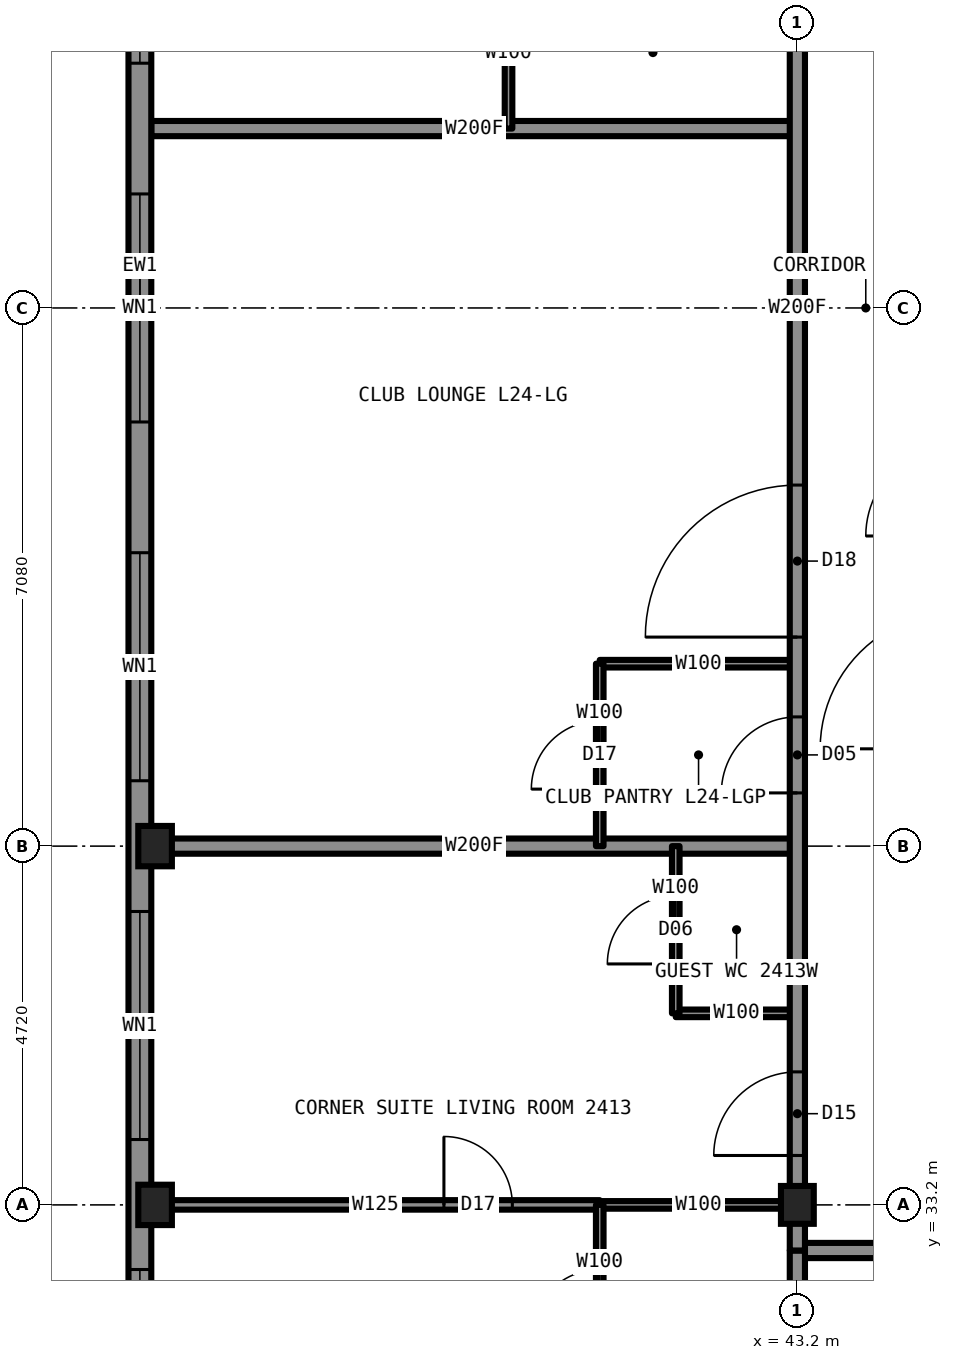
"""IFC4 building model, lengths in metres.
Left out: names, types, materials, properties, quantities, classifications, styles, units other than length and angle.
Written with IfcOpenShell. Run it as: python <this file> out.ifc"""

import sys

from ifc_helpers import new_model, si_unit, direction, frame, frame_2d, origin, origin_2d, place, context, subcontext, project, spatial, rectangle, i_section, extrude, element, fill, save


model = new_model("IFC4")
c1 = context("Model", 3, precision=1e-05, world=origin(), true_north=direction((0.0, 1.0)))
c2 = subcontext(c1, "Body", "Model", "MODEL_VIEW")
j1 = project(units=[si_unit("LENGTHUNIT", "METRE"), si_unit("PLANEANGLEUNIT", "RADIAN")], contexts=[c1])
p1 = place(None, origin())
s1 = spatial("IfcSite", under=j1, at=p1, CompositionType="ELEMENT")
p2 = place(p1, origin())
s2 = spatial("IfcBuilding", under=s1, at=p2, CompositionType="ELEMENT")
p3 = place(p2, frame((0.0, 0.0, 93.4)))
s3 = spatial("IfcBuildingStorey", under=s2, at=p3, CompositionType="ELEMENT", Elevation=93.4)
for number, where, z_axis, x_axis in (
    (1, (34.75, 33.2, 0.0), (0.0, 0.0, 1.0), (1.0, 0.0, 0.0)),
    (2, (34.75, 37.92, 0.0), (0.0, 0.0, 1.0), (1.0, 0.0, 0.0)),
):
    element("IfcColumn", number, at=place(p3, frame(where, z_axis=z_axis, x_axis=x_axis)), inside=s3, PredefinedType="COLUMN", context=c2, shape_type="SweptSolid", body=[
        extrude(i_section(OverallWidth=0.442, OverallDepth=0.531, WebThickness=0.066, FlangeThickness=0.106, at=origin_2d()), origin(), (0.0, 0.0, 1.0), 3.5),
    ])
p4 = place(p3, frame((43.2, 33.2, 0.0), z_axis=(0.0, 0.0, 1.0), x_axis=(1.0, 0.0, 0.0)))
e3 = element("IfcColumn", 3, at=p4, inside=s3, PredefinedType="COLUMN", context=c2, shape_type="SweptSolid", body=[
    extrude(i_section(OverallWidth=0.432, OverallDepth=0.498, WebThickness=0.056, FlangeThickness=0.089, at=origin_2d()), origin(), (0.0, 0.0, 1.0), 3.5),
])
p5 = place(p3, frame((40.6, 33.2, 0.0), z_axis=(0.0, 0.0, 1.0), x_axis=(1.0, 0.0, 0.0)))
e4 = element("IfcWall", 4, at=p5, inside=s3, PredefinedType="PARTITIONING", context=c2, shape_type="SweptSolid", body=[
    extrude(rectangle(XDim=2.6, YDim=0.1, at=frame_2d((1.3, 0.0))), origin(), (0.0, 0.0, 1.0), 2.573),
])
p6 = place(p3, frame((34.7, 33.2, 0.0), z_axis=(0.0, 0.0, 1.0), x_axis=(1.0, 0.0, 0.0)))
e5 = element("IfcWall", 5, at=p6, inside=s3, PredefinedType="PARTITIONING", context=c2, shape_type="SweptSolid", body=[
    extrude(rectangle(XDim=5.9, YDim=0.125, at=frame_2d((2.95, 0.0))), origin(), (0.0, 0.0, 1.0), 2.573),
])
p7 = place(p6, frame((3.85, 0.0, 0.0)))
e6 = element("IfcOpeningElement", 6, at=p7, cuts=e5, PredefinedType="OPENING", context=c2, shape_type="SweptSolid", body=[
    extrude(rectangle(XDim=0.9, YDim=2.2, at=frame_2d((0.45, 1.1))), frame((0.0, 0.073, 0.0), z_axis=(0.0, -1.0, 0.0), x_axis=(1.0, 0.0, 0.0)), (0.0, 0.0, 1.0), 0.145),
])
p8 = place(p3, frame((43.2, 32.6, 0.0), z_axis=(0.0, 0.0, 1.0), x_axis=(1.0, 0.0, 0.0)))
e7 = element("IfcWall", 7, at=p8, inside=s3, PredefinedType="PARTITIONING", context=c2, shape_type="SweptSolid", body=[
    extrude(rectangle(XDim=23.6, YDim=0.2, at=frame_2d((11.8, 0.0))), origin(), (0.0, 0.0, 1.0), 3.33),
])
p9 = place(p8, frame((3.0, 0.0, 0.0)))
e8 = element("IfcOpeningElement", 8, at=p9, cuts=e7, PredefinedType="OPENING", context=c2, shape_type="SweptSolid", body=[
    extrude(rectangle(XDim=1.0, YDim=2.2, at=frame_2d((0.5, 1.1))), frame((0.0, 0.11, 0.0), z_axis=(0.0, -1.0, 0.0), x_axis=(1.0, 0.0, 0.0)), (0.0, 0.0, 1.0), 0.22),
])
p10 = place(p8, frame((9.84, 0.0, 0.0)))
e9 = element("IfcOpeningElement", 9, at=p10, cuts=e7, PredefinedType="OPENING", context=c2, shape_type="SweptSolid", body=[
    extrude(rectangle(XDim=1.0, YDim=2.2, at=frame_2d((0.5, 1.1))), frame((0.0, 0.11, 0.0), z_axis=(0.0, -1.0, 0.0), x_axis=(1.0, 0.0, 0.0)), (0.0, 0.0, 1.0), 0.22),
])
p11 = place(p8, frame((17.16, 0.0, 0.0)))
e10 = element("IfcOpeningElement", 10, at=p11, cuts=e7, PredefinedType="OPENING", context=c2, shape_type="SweptSolid", body=[
    extrude(rectangle(XDim=1.0, YDim=2.2, at=frame_2d((0.5, 1.1))), frame((0.0, 0.11, 0.0), z_axis=(0.0, -1.0, 0.0), x_axis=(1.0, 0.0, 0.0)), (0.0, 0.0, 1.0), 0.22),
])
p12 = place(p3, frame((40.6, 40.32, 0.0), z_axis=(0.0, 0.0, 1.0), x_axis=(1.0, 0.0, 0.0)))
e11 = element("IfcWall", 11, at=p12, inside=s3, PredefinedType="PARTITIONING", context=c2, shape_type="SweptSolid", body=[
    extrude(rectangle(XDim=2.6, YDim=0.1, at=frame_2d((1.3, 0.0))), origin(), (0.0, 0.0, 1.0), 2.731),
])
p13 = place(p3, frame((34.7, 37.92, 0.0), z_axis=(0.0, 0.0, 1.0), x_axis=(1.0, 0.0, 0.0)))
e12 = element("IfcWall", 12, at=p13, inside=s3, PredefinedType="PARTITIONING", context=c2, shape_type="SweptSolid", body=[
    extrude(rectangle(XDim=8.5, YDim=0.2, at=frame_2d((4.25, 0.0))), origin(), (0.0, 0.0, 1.0), 2.573),
])
p14 = place(p3, frame((41.6, 35.72, 0.0), z_axis=(0.0, 0.0, 1.0), x_axis=(1.0, 0.0, 0.0)))
e13 = element("IfcWall", 13, at=p14, inside=s3, PredefinedType="PARTITIONING", context=c2, shape_type="SweptSolid", body=[
    extrude(rectangle(XDim=1.6, YDim=0.1, at=frame_2d((0.8, 0.0))), origin(), (0.0, 0.0, 1.0), 3.33),
])
p15 = place(p3, frame((34.7, 47.36, 0.0), z_axis=(0.0, 0.0, 1.0), x_axis=(1.0, 0.0, 0.0)))
e14 = element("IfcWall", 14, at=p15, inside=s3, PredefinedType="PARTITIONING", context=c2, shape_type="SweptSolid", body=[
    extrude(rectangle(XDim=8.5, YDim=0.2, at=frame_2d((4.25, 0.0))), origin(), (0.0, 0.0, 1.0), 2.731),
])
p16 = place(p3, frame((43.2, 33.22, 0.0), z_axis=(0.0, 0.0, 1.0), x_axis=(0.0, 1.0, 0.0)))
e15 = element("IfcWall", 15, at=p16, inside=s3, PredefinedType="PARTITIONING", context=c2, shape_type="SweptSolid", body=[
    extrude(rectangle(XDim=23.56, YDim=0.2, at=frame_2d((11.78, 0.0))), origin(), (0.0, 0.0, 1.0), 3.33),
])
p17 = place(p16, frame((16.4, 0.0, 0.0)))
e16 = element("IfcOpeningElement", 16, at=p17, cuts=e15, PredefinedType="OPENING", context=c2, shape_type="SweptSolid", body=[
    extrude(rectangle(XDim=1.0, YDim=2.2, at=frame_2d((0.5, 1.1))), frame((0.0, 0.11, 0.0), z_axis=(0.0, -1.0, 0.0), x_axis=(1.0, 0.0, 0.0)), (0.0, 0.0, 1.0), 0.22),
])
p18 = place(p16, frame((21.83, 0.0, 0.0)))
e17 = element("IfcOpeningElement", 17, at=p18, cuts=e15, PredefinedType="OPENING", context=c2, shape_type="SweptSolid", body=[
    extrude(rectangle(XDim=1.1, YDim=2.2, at=frame_2d((0.55, 1.1))), frame((0.0, 0.11, 0.0), z_axis=(0.0, -1.0, 0.0), x_axis=(1.0, 0.0, 0.0)), (0.0, 0.0, 1.0), 0.22),
])
p19 = place(p16, frame((0.63, 0.0, 0.0)))
e18 = element("IfcOpeningElement", 18, at=p19, cuts=e15, PredefinedType="OPENING", context=c2, shape_type="SweptSolid", body=[
    extrude(rectangle(XDim=1.1, YDim=2.2, at=frame_2d((0.55, 1.1))), frame((0.0, 0.11, 0.0), z_axis=(0.0, -1.0, 0.0), x_axis=(1.0, 0.0, 0.0)), (0.0, 0.0, 1.0), 0.22),
])
p20 = place(p16, frame((7.45, 0.0, 0.0)))
e19 = element("IfcOpeningElement", 19, at=p20, cuts=e15, PredefinedType="OPENING", context=c2, shape_type="SweptSolid", body=[
    extrude(rectangle(XDim=2.0, YDim=2.4, at=frame_2d((1.0, 1.2))), frame((0.0, 0.11, 0.0), z_axis=(0.0, -1.0, 0.0), x_axis=(1.0, 0.0, 0.0)), (0.0, 0.0, 1.0), 0.22),
])
p21 = place(p16, frame((5.4, 0.0, 0.0)))
e20 = element("IfcOpeningElement", 20, at=p21, cuts=e15, PredefinedType="OPENING", context=c2, shape_type="SweptSolid", body=[
    extrude(rectangle(XDim=1.0, YDim=2.1, at=frame_2d((0.5, 1.05))), frame((0.0, 0.11, 0.0), z_axis=(0.0, -1.0, 0.0), x_axis=(1.0, 0.0, 0.0)), (0.0, 0.0, 1.0), 0.22),
])
p22 = place(p3, frame((43.2, 24.7, 0.0), z_axis=(0.0, 0.0, 1.0), x_axis=(0.0, 1.0, 0.0)))
e21 = element("IfcWall", 21, at=p22, inside=s3, PredefinedType="PARTITIONING", context=c2, shape_type="SweptSolid", body=[
    extrude(rectangle(XDim=7.9, YDim=0.2, at=frame_2d((3.95, 0.0))), origin(), (0.0, 0.0, 1.0), 2.573),
])
p23 = place(p3, frame((41.6, 35.72, 0.0), z_axis=(0.0, 0.0, 1.0), x_axis=(0.0, 1.0, 0.0)))
e22 = element("IfcWall", 22, at=p23, inside=s3, PredefinedType="PARTITIONING", context=c2, shape_type="SweptSolid", body=[
    extrude(rectangle(XDim=2.2, YDim=0.1, at=frame_2d((1.1, 0.0))), origin(), (0.0, 0.0, 1.0), 3.33),
])
p24 = place(p23, frame((0.65, 0.0, 0.0)))
e23 = element("IfcOpeningElement", 23, at=p24, cuts=e22, PredefinedType="OPENING", context=c2, shape_type="SweptSolid", body=[
    extrude(rectangle(XDim=0.9, YDim=2.1, at=frame_2d((0.45, 1.05))), frame((0.0, 0.06, 0.0), z_axis=(0.0, -1.0, 0.0), x_axis=(1.0, 0.0, 0.0)), (0.0, 0.0, 1.0), 0.12),
])
p25 = place(p3, frame((40.6, 30.6, 0.0), z_axis=(0.0, 0.0, 1.0), x_axis=(0.0, 1.0, 0.0)))
e24 = element("IfcWall", 24, at=p25, inside=s3, PredefinedType="PARTITIONING", context=c2, shape_type="SweptSolid", body=[
    extrude(rectangle(XDim=2.6, YDim=0.1, at=frame_2d((1.3, 0.0))), origin(), (0.0, 0.0, 1.0), 3.33),
])
p26 = place(p25, frame((0.85, 0.0, 0.0)))
e25 = element("IfcOpeningElement", 25, at=p26, cuts=e24, PredefinedType="OPENING", context=c2, shape_type="SweptSolid", body=[
    extrude(rectangle(XDim=0.9, YDim=2.1, at=frame_2d((0.45, 1.05))), frame((0.0, 0.06, 0.0), z_axis=(0.0, -1.0, 0.0), x_axis=(1.0, 0.0, 0.0)), (0.0, 0.0, 1.0), 0.12),
])
p27 = place(p3, frame((40.6, 37.92, 0.0), z_axis=(0.0, 0.0, 1.0), x_axis=(0.0, 1.0, 0.0)))
e26 = element("IfcWall", 26, at=p27, inside=s3, PredefinedType="PARTITIONING", context=c2, shape_type="SweptSolid", body=[
    extrude(rectangle(XDim=2.4, YDim=0.1, at=frame_2d((1.2, 0.0))), origin(), (0.0, 0.0, 1.0), 3.33),
])
p28 = place(p27, frame((0.75, 0.0, 0.0)))
e27 = element("IfcOpeningElement", 27, at=p28, cuts=e26, PredefinedType="OPENING", context=c2, shape_type="SweptSolid", body=[
    extrude(rectangle(XDim=0.9, YDim=2.2, at=frame_2d((0.45, 1.1))), frame((0.0, 0.06, 0.0), z_axis=(0.0, -1.0, 0.0), x_axis=(1.0, 0.0, 0.0)), (0.0, 0.0, 1.0), 0.12),
])
p29 = place(p3, frame((39.4, 47.36, 0.0), z_axis=(0.0, 0.0, 1.0), x_axis=(0.0, 1.0, 0.0)))
e28 = element("IfcWall", 28, at=p29, inside=s3, PredefinedType="PARTITIONING", context=c2, shape_type="SweptSolid", body=[
    extrude(rectangle(XDim=2.0, YDim=0.1, at=frame_2d((1.0, 0.0))), origin(), (0.0, 0.0, 1.0), 3.33),
])
p30 = place(p3, frame((34.55, 60.1, 0.0), z_axis=(0.0, 0.0, 1.0), x_axis=(0.0, -1.0, 0.0)))
e29 = element("IfcWall", 29, at=p30, inside=s3, PredefinedType="SOLIDWALL", context=c2, shape_type="SweptSolid", body=[
    extrude(rectangle(XDim=30.2, YDim=0.3, at=frame_2d((15.1, 0.0))), origin(), (0.0, 0.0, 1.0), 2.83),
])
p31 = place(p30, frame((0.85, 0.0, 0.5)))
e30 = element("IfcOpeningElement", 30, at=p31, cuts=e29, PredefinedType="OPENING", context=c2, shape_type="SweptSolid", body=[
    extrude(rectangle(XDim=1.6, YDim=2.0, at=frame_2d((0.8, 1.0))), frame((0.0, 0.16, 0.0), z_axis=(0.0, -1.0, 0.0), x_axis=(1.0, 0.0, 0.0)), (0.0, 0.0, 1.0), 0.32),
])
p32 = place(p30, frame((4.16, 0.0, 0.5)))
e31 = element("IfcOpeningElement", 31, at=p32, cuts=e29, PredefinedType="OPENING", context=c2, shape_type="SweptSolid", body=[
    extrude(rectangle(XDim=3.0, YDim=2.0, at=frame_2d((1.5, 1.0))), frame((0.0, 0.16, 0.0), z_axis=(0.0, -1.0, 0.0), x_axis=(1.0, 0.0, 0.0)), (0.0, 0.0, 1.0), 0.32),
])
p33 = place(p30, frame((8.88, 0.0, 0.5)))
e32 = element("IfcOpeningElement", 32, at=p33, cuts=e29, PredefinedType="OPENING", context=c2, shape_type="SweptSolid", body=[
    extrude(rectangle(XDim=3.0, YDim=2.0, at=frame_2d((1.5, 1.0))), frame((0.0, 0.16, 0.0), z_axis=(0.0, -1.0, 0.0), x_axis=(1.0, 0.0, 0.0)), (0.0, 0.0, 1.0), 0.32),
])
p34 = place(p30, frame((13.6, 0.0, 0.5)))
e33 = element("IfcOpeningElement", 33, at=p34, cuts=e29, PredefinedType="OPENING", context=c2, shape_type="SweptSolid", body=[
    extrude(rectangle(XDim=3.0, YDim=2.0, at=frame_2d((1.5, 1.0))), frame((0.0, 0.16, 0.0), z_axis=(0.0, -1.0, 0.0), x_axis=(1.0, 0.0, 0.0)), (0.0, 0.0, 1.0), 0.32),
])
p35 = place(p30, frame((18.32, 0.0, 0.5)))
e34 = element("IfcOpeningElement", 34, at=p35, cuts=e29, PredefinedType="OPENING", context=c2, shape_type="SweptSolid", body=[
    extrude(rectangle(XDim=3.0, YDim=2.0, at=frame_2d((1.5, 1.0))), frame((0.0, 0.16, 0.0), z_axis=(0.0, -1.0, 0.0), x_axis=(1.0, 0.0, 0.0)), (0.0, 0.0, 1.0), 0.32),
])
p36 = place(p30, frame((23.04, 0.0, 0.5)))
e35 = element("IfcOpeningElement", 35, at=p36, cuts=e29, PredefinedType="OPENING", context=c2, shape_type="SweptSolid", body=[
    extrude(rectangle(XDim=3.0, YDim=2.0, at=frame_2d((1.5, 1.0))), frame((0.0, 0.16, 0.0), z_axis=(0.0, -1.0, 0.0), x_axis=(1.0, 0.0, 0.0)), (0.0, 0.0, 1.0), 0.32),
])
p37 = place(p30, frame((27.75, 0.0, 0.5)))
e36 = element("IfcOpeningElement", 36, at=p37, cuts=e29, PredefinedType="OPENING", context=c2, shape_type="SweptSolid", body=[
    extrude(rectangle(XDim=1.6, YDim=2.0, at=frame_2d((0.8, 1.0))), frame((0.0, 0.16, 0.0), z_axis=(0.0, -1.0, 0.0), x_axis=(1.0, 0.0, 0.0)), (0.0, 0.0, 1.0), 0.32),
])
p38 = place(p3, frame((43.2, 32.6, 0.0), z_axis=(0.0, 0.0, 1.0), x_axis=(0.0, 1.0, 0.0)))
e37 = element("IfcWall", 37, at=p38, inside=s3, PredefinedType="PARTITIONING", context=c2, shape_type="SweptSolid", body=[
    extrude(rectangle(XDim=0.62, YDim=0.2, at=frame_2d((0.31, 0.0))), origin(), (0.0, 0.0, 1.0), 2.573),
])
p39 = place(p19, origin())
e38 = element("IfcDoor", 38, at=p39, inside=s3, OperationType="SINGLE_SWING_LEFT", PredefinedType="DOOR", context=c2, shape_type="SweptSolid", body=[
    extrude(rectangle(XDim=1.1, YDim=2.2, at=frame_2d((0.55, 1.1))), frame((0.0, 0.025, 0.0), z_axis=(0.0, -1.0, 0.0), x_axis=(1.0, 0.0, 0.0)), (0.0, 0.0, 1.0), 0.05),
])
fill(e18, e38)
p40 = place(p26, origin())
e39 = element("IfcDoor", 39, at=p40, inside=s3, OperationType="SINGLE_SWING_RIGHT", PredefinedType="DOOR", context=c2, shape_type="SweptSolid", body=[
    extrude(rectangle(XDim=0.9, YDim=2.1, at=frame_2d((0.45, 1.05))), frame((0.0, 0.025, 0.0), z_axis=(0.0, -1.0, 0.0), x_axis=(1.0, 0.0, 0.0)), (0.0, 0.0, 1.0), 0.05),
])
fill(e25, e39)
p41 = place(p7, origin())
e40 = element("IfcDoor", 40, at=p41, inside=s3, OperationType="SINGLE_SWING_LEFT", PredefinedType="DOOR", context=c2, shape_type="SweptSolid", body=[
    extrude(rectangle(XDim=0.9, YDim=2.2, at=frame_2d((0.45, 1.1))), frame((0.0, 0.025, 0.0), z_axis=(0.0, -1.0, 0.0), x_axis=(1.0, 0.0, 0.0)), (0.0, 0.0, 1.0), 0.05),
])
fill(e6, e40)
p42 = place(p24, origin())
e41 = element("IfcDoor", 41, at=p42, inside=s3, OperationType="SINGLE_SWING_LEFT", PredefinedType="DOOR", context=c2, shape_type="SweptSolid", body=[
    extrude(rectangle(XDim=0.9, YDim=2.1, at=frame_2d((0.45, 1.05))), frame((0.0, 0.025, 0.0), z_axis=(0.0, -1.0, 0.0), x_axis=(1.0, 0.0, 0.0)), (0.0, 0.0, 1.0), 0.05),
])
fill(e23, e41)
p43 = place(p20, origin())
e42 = element("IfcDoor", 42, at=p43, inside=s3, OperationType="DOUBLE_DOOR_SINGLE_SWING", PredefinedType="DOOR", context=c2, shape_type="SweptSolid", body=[
    extrude(rectangle(XDim=2.0, YDim=2.4, at=frame_2d((1.0, 1.2))), frame((0.0, 0.025, 0.0), z_axis=(0.0, -1.0, 0.0), x_axis=(1.0, 0.0, 0.0)), (0.0, 0.0, 1.0), 0.05),
])
fill(e19, e42)
p44 = place(p28, origin())
e43 = element("IfcDoor", 43, at=p44, inside=s3, OperationType="SINGLE_SWING_LEFT", PredefinedType="DOOR", context=c2, shape_type="SweptSolid", body=[
    extrude(rectangle(XDim=0.9, YDim=2.2, at=frame_2d((0.45, 1.1))), frame((0.0, 0.025, 0.0), z_axis=(0.0, -1.0, 0.0), x_axis=(1.0, 0.0, 0.0)), (0.0, 0.0, 1.0), 0.05),
])
fill(e27, e43)
p45 = place(p21, origin())
e44 = element("IfcDoor", 44, at=p45, inside=s3, OperationType="SINGLE_SWING_LEFT", PredefinedType="DOOR", context=c2, shape_type="SweptSolid", body=[
    extrude(rectangle(XDim=1.0, YDim=2.1, at=frame_2d((0.5, 1.05))), frame((0.0, 0.025, 0.0), z_axis=(0.0, -1.0, 0.0), x_axis=(1.0, 0.0, 0.0)), (0.0, 0.0, 1.0), 0.05),
])
fill(e20, e44)
p46 = place(p33, origin())
e45 = element("IfcWindow", 45, at=p46, inside=s3, PartitioningType="SINGLE_PANEL", PredefinedType="WINDOW", context=c2, shape_type="SweptSolid", body=[
    extrude(rectangle(XDim=3.0, YDim=2.0, at=frame_2d((1.5, 1.0))), frame((0.0, 0.03, 0.0), z_axis=(0.0, -1.0, 0.0), x_axis=(1.0, 0.0, 0.0)), (0.0, 0.0, 1.0), 0.06),
])
fill(e32, e45)
p47 = place(p34, origin())
e46 = element("IfcWindow", 46, at=p47, inside=s3, PartitioningType="SINGLE_PANEL", PredefinedType="WINDOW", context=c2, shape_type="SweptSolid", body=[
    extrude(rectangle(XDim=3.0, YDim=2.0, at=frame_2d((1.5, 1.0))), frame((0.0, 0.03, 0.0), z_axis=(0.0, -1.0, 0.0), x_axis=(1.0, 0.0, 0.0)), (0.0, 0.0, 1.0), 0.06),
])
fill(e33, e46)
p48 = place(p35, origin())
e47 = element("IfcWindow", 47, at=p48, inside=s3, PartitioningType="SINGLE_PANEL", PredefinedType="WINDOW", context=c2, shape_type="SweptSolid", body=[
    extrude(rectangle(XDim=3.0, YDim=2.0, at=frame_2d((1.5, 1.0))), frame((0.0, 0.03, 0.0), z_axis=(0.0, -1.0, 0.0), x_axis=(1.0, 0.0, 0.0)), (0.0, 0.0, 1.0), 0.06),
])
fill(e34, e47)
p49 = place(p36, origin())
e48 = element("IfcWindow", 48, at=p49, inside=s3, PartitioningType="SINGLE_PANEL", PredefinedType="WINDOW", context=c2, shape_type="SweptSolid", body=[
    extrude(rectangle(XDim=3.0, YDim=2.0, at=frame_2d((1.5, 1.0))), frame((0.0, 0.03, 0.0), z_axis=(0.0, -1.0, 0.0), x_axis=(1.0, 0.0, 0.0)), (0.0, 0.0, 1.0), 0.06),
])
fill(e35, e48)
p50 = place(p37, origin())
e49 = element("IfcWindow", 49, at=p50, inside=s3, PartitioningType="SINGLE_PANEL", PredefinedType="WINDOW", context=c2, shape_type="SweptSolid", body=[
    extrude(rectangle(XDim=1.6, YDim=2.0, at=frame_2d((0.8, 1.0))), frame((0.0, 0.03, 0.0), z_axis=(0.0, -1.0, 0.0), x_axis=(1.0, 0.0, 0.0)), (0.0, 0.0, 1.0), 0.06),
])
fill(e36, e49)
save(model, sys.argv[1])
